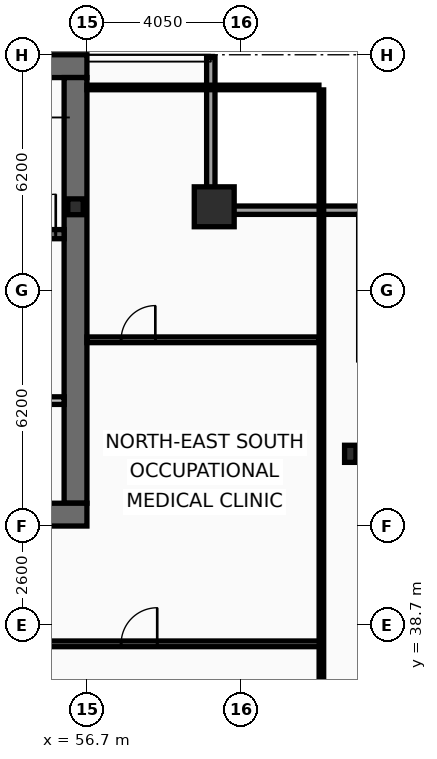
"""IFC4 building model, lengths in metres.
Left out: names, types, materials, properties, quantities, classifications, styles, units other than length and angle.
Written with IfcOpenShell. Run it as: python <this file> out.ifc"""

import sys

from ifc_helpers import new_model, si_unit, direction, frame, frame_2d, origin, origin_2d, place, context, subcontext, project, spatial, rectangle, hollow_rectangle, i_section, extrude, element, fill, save


model = new_model("IFC4")
c1 = context("Model", 3, precision=1e-05, world=origin(), true_north=direction((0.0, 1.0)))
c2 = subcontext(c1, "Body", "Model", "MODEL_VIEW")
j1 = project(units=[si_unit("LENGTHUNIT", "METRE"), si_unit("PLANEANGLEUNIT", "RADIAN")], contexts=[c1])
p1 = place(None, origin())
s1 = spatial("IfcSite", under=j1, at=p1, CompositionType="ELEMENT")
p2 = place(p1, origin())
s2 = spatial("IfcBuilding", under=s1, at=p2, CompositionType="ELEMENT")
p3 = place(p2, frame((0.0, 0.0, 261.8)))
s3 = spatial("IfcBuildingStorey", under=s2, at=p3, CompositionType="ELEMENT", Elevation=261.8)
p4 = place(p3, frame((16.2, 53.4, 0.0), z_axis=(0.0, 0.0, 1.0), x_axis=(1.0, 0.0, 0.0)))
e1 = element("IfcWall", 1, at=p4, inside=s3, PredefinedType="SHEAR", context=c2, shape_type="SweptSolid", body=[
    extrude(rectangle(XDim=40.5, YDim=0.6, at=frame_2d((20.25, 0.0))), origin(), (0.0, 0.0, 1.0), 3.4),
])
p5 = place(p3, frame((56.4, 53.1, 0.0), z_axis=(0.0, 0.0, 1.0), x_axis=(0.0, -1.0, 0.0)))
e2 = element("IfcWall", 2, at=p5, inside=s3, PredefinedType="SHEAR", context=c2, shape_type="SweptSolid", body=[
    extrude(rectangle(XDim=11.2, YDim=0.6, at=frame_2d((5.6, 0.0))), origin(), (0.0, 0.0, 1.0), 3.4),
])
p6 = place(p3, frame((56.7, 41.6, 0.0), z_axis=(0.0, 0.0, 1.0), x_axis=(-1.0, 0.0, 0.0)))
e3 = element("IfcWall", 3, at=p6, inside=s3, PredefinedType="SHEAR", context=c2, shape_type="SweptSolid", body=[
    extrude(rectangle(XDim=2.45, YDim=0.6, at=frame_2d((1.225, 0.0))), origin(), (0.0, 0.0, 1.0), 3.4),
])
p7 = place(p3, frame((48.63, 48.98, 0.0), z_axis=(0.0, 0.0, 1.0), x_axis=(1.0, 0.0, 0.0)))
e4 = element("IfcWall", 4, at=p7, inside=s3, PredefinedType="SHEAR", context=c2, shape_type="SweptSolid", body=[
    extrude(rectangle(XDim=7.47, YDim=0.24, at=frame_2d((3.735, 0.0))), origin(), (0.0, 0.0, 1.0), 3.4),
])
p8 = place(p7, frame((6.2, 0.0, 0.0)))
e5 = element("IfcOpeningElement", 5, at=p8, cuts=e4, PredefinedType="OPENING", context=c2, shape_type="SweptSolid", body=[
    extrude(rectangle(XDim=1.05, YDim=2.15, at=frame_2d((0.525, 1.075))), frame((0.0, 0.13, 0.0), z_axis=(0.0, -1.0, 0.0), x_axis=(1.0, 0.0, 0.0)), (0.0, 0.0, 1.0), 0.26),
])
p9 = place(p3, frame((60.05, 49.7, 0.0), z_axis=(0.0, 0.0, 1.0), x_axis=(1.0, 0.0, 0.0)))
e6 = element("IfcColumn", 6, at=p9, inside=s3, PredefinedType="COLUMN", context=c2, shape_type="SweptSolid", body=[
    extrude(hollow_rectangle(XDim=1.05, YDim=1.05, WallThickness=0.055, at=origin_2d()), origin(), (0.0, 0.0, 1.0), 3.6),
])
p10 = place(p3, frame((63.63, 43.2, 0.0), z_axis=(0.0, 0.0, 1.0), x_axis=(1.0, 0.0, 0.0)))
e7 = element("IfcColumn", 7, at=p10, inside=s3, PredefinedType="COLUMN", context=c2, shape_type="SweptSolid", body=[
    extrude(i_section(OverallWidth=0.3, OverallDepth=0.45, WebThickness=0.014, FlangeThickness=0.026, at=origin_2d()), origin(), (0.0, 0.0, 1.0), 3.6),
])
p11 = place(p3, frame((56.4, 49.7, 0.0), z_axis=(0.0, 0.0, 1.0), x_axis=(1.0, 0.0, 0.0)))
e8 = element("IfcColumn", 8, at=p11, inside=s3, PredefinedType="COLUMN", context=c2, shape_type="SweptSolid", body=[
    extrude(i_section(OverallWidth=0.406, OverallDepth=0.416, WebThickness=0.03, FlangeThickness=0.048, at=origin_2d()), origin(), (0.0, 0.0, 1.0), 3.6),
])
p12 = place(p3, frame((59.96, 53.63, 0.0), z_axis=(0.0, 0.0, 1.0), x_axis=(0.0, -1.0, 0.0)))
e9 = element("IfcWall", 9, at=p12, inside=s3, PredefinedType="SOLIDWALL", context=c2, shape_type="SweptSolid", body=[
    extrude(rectangle(XDim=3.91, YDim=0.22, at=frame_2d((1.955, 0.0))), origin(), (0.0, 0.0, 1.0), 2.79),
])
p13 = place(p3, frame((59.85, 49.61, 0.0), z_axis=(0.0, 0.0, 1.0), x_axis=(1.0, 0.0, 0.0)))
e10 = element("IfcWall", 10, at=p13, inside=s3, PredefinedType="SOLIDWALL", context=c2, shape_type="SweptSolid", body=[
    extrude(rectangle(XDim=4.22, YDim=0.22, at=frame_2d((2.11, 0.0))), origin(), (0.0, 0.0, 1.0), 2.79),
])
p14 = place(p3, frame((51.9, 44.6, 0.0), z_axis=(0.0, 0.0, 1.0), x_axis=(1.0, 0.0, 0.0)))
e11 = element("IfcWall", 11, at=p14, inside=s3, PredefinedType="PARTITIONING", context=c2, shape_type="SweptSolid", body=[
    extrude(rectangle(XDim=4.2, YDim=0.2, at=frame_2d((2.1, 0.0))), origin(), (0.0, 0.0, 1.0), 3.4),
])
p15 = place(p14, frame((1.15, 0.0, 0.0)))
e12 = element("IfcOpeningElement", 12, at=p15, cuts=e11, PredefinedType="OPENING", context=c2, shape_type="SweptSolid", body=[
    extrude(rectangle(XDim=1.05, YDim=2.15, at=frame_2d((0.525, 1.075))), frame((0.0, 0.11, 0.0), z_axis=(0.0, -1.0, 0.0), x_axis=(1.0, 0.0, 0.0)), (0.0, 0.0, 1.0), 0.22),
])
p16 = place(p3, frame((54.35, 38.2, 0.0), z_axis=(0.0, 0.0, 1.0), x_axis=(1.0, 0.0, 0.0)))
e13 = element("IfcWall", 13, at=p16, inside=s3, PredefinedType="PARTITIONING", context=c2, shape_type="SweptSolid", body=[
    extrude(rectangle(XDim=8.52, YDim=0.15, at=frame_2d((4.26, 0.0))), origin(), (0.0, 0.0, 1.0), 2.74),
])
p17 = place(p16, frame((3.25, 0.0, 0.0)))
e14 = element("IfcOpeningElement", 14, at=p17, cuts=e13, PredefinedType="OPENING", context=c2, shape_type="SweptSolid", body=[
    extrude(rectangle(XDim=0.95, YDim=2.05, at=frame_2d((0.475, 1.025))), frame((0.0, 0.085, 0.0), z_axis=(0.0, -1.0, 0.0), x_axis=(1.0, 0.0, 0.0)), (0.0, 0.0, 1.0), 0.17),
])
p18 = place(p3, frame((56.7, 46.2, 0.0), z_axis=(0.0, 0.0, 1.0), x_axis=(1.0, 0.0, 0.0)))
e15 = element("IfcWall", 15, at=p18, inside=s3, PredefinedType="PARTITIONING", context=c2, shape_type="SweptSolid", body=[
    extrude(rectangle(XDim=6.105, YDim=0.15, at=frame_2d((3.052, 0.0))), origin(), (0.0, 0.0, 1.0), 2.79),
])
p19 = place(p18, frame((0.9, 0.0, 0.0)))
e16 = element("IfcOpeningElement", 16, at=p19, cuts=e15, PredefinedType="OPENING", context=c2, shape_type="SweptSolid", body=[
    extrude(rectangle(XDim=0.9, YDim=2.05, at=frame_2d((0.45, 1.025))), frame((0.0, 0.085, 0.0), z_axis=(0.0, -1.0, 0.0), x_axis=(1.0, 0.0, 0.0)), (0.0, 0.0, 1.0), 0.17),
])
p20 = place(p3, frame((62.87, 10.665, 0.0), z_axis=(0.0, 0.0, 1.0), x_axis=(0.0, 1.0, 0.0)))
e17 = element("IfcWall", 17, at=p20, inside=s3, PredefinedType="PARTITIONING", context=c2, shape_type="SweptSolid", body=[
    extrude(rectangle(XDim=42.11, YDim=0.12, at=frame_2d((21.055, 0.0))), origin(), (0.0, 0.0, 1.0), 2.74),
])
p21 = place(p3, frame((56.7, 52.84, 0.0), z_axis=(0.0, 0.0, 1.0), x_axis=(1.0, 0.0, 0.0)))
e18 = element("IfcWall", 18, at=p21, inside=s3, PredefinedType="PARTITIONING", context=c2, shape_type="SweptSolid", body=[
    extrude(rectangle(XDim=6.105, YDim=0.12, at=frame_2d((3.052, 0.0))), origin(), (0.0, 0.0, 1.0), 3.4),
])
p22 = place(p8, origin())
e19 = element("IfcDoor", 19, at=p22, inside=s3, OperationType="SINGLE_SWING_RIGHT", PredefinedType="DOOR", context=c2, shape_type="SweptSolid", body=[
    extrude(rectangle(XDim=1.05, YDim=2.15, at=frame_2d((0.525, 1.075))), frame((0.0, 0.025, 0.0), z_axis=(0.0, -1.0, 0.0), x_axis=(1.0, 0.0, 0.0)), (0.0, 0.0, 1.0), 0.05),
])
fill(e5, e19)
p23 = place(p17, origin())
e20 = element("IfcDoor", 20, at=p23, inside=s3, OperationType="SINGLE_SWING_RIGHT", PredefinedType="DOOR", context=c2, shape_type="SweptSolid", body=[
    extrude(rectangle(XDim=0.95, YDim=2.05, at=frame_2d((0.475, 1.025))), frame((0.0, 0.025, 0.0), z_axis=(0.0, -1.0, 0.0), x_axis=(1.0, 0.0, 0.0)), (0.0, 0.0, 1.0), 0.05),
])
fill(e14, e20)
p24 = place(p19, origin())
e21 = element("IfcDoor", 21, at=p24, inside=s3, OperationType="SINGLE_SWING_RIGHT", PredefinedType="DOOR", context=c2, shape_type="SweptSolid", body=[
    extrude(rectangle(XDim=0.9, YDim=2.05, at=frame_2d((0.45, 1.025))), frame((0.0, 0.025, 0.0), z_axis=(0.0, -1.0, 0.0), x_axis=(1.0, 0.0, 0.0)), (0.0, 0.0, 1.0), 0.05),
])
fill(e16, e21)
save(model, sys.argv[1])
